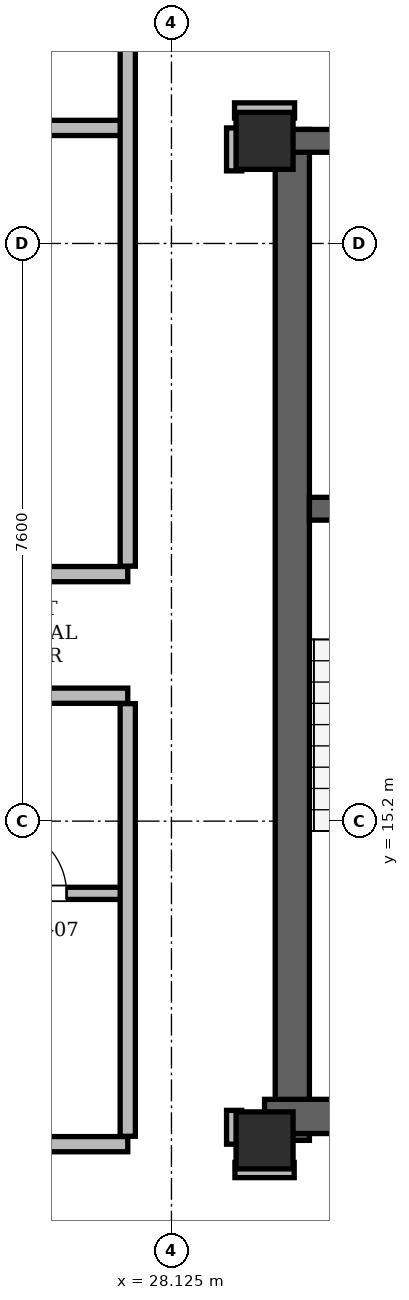
"""IFC4 building model, lengths in metres.
Left out: names, types, materials, properties, quantities, classifications, styles, units other than length and angle.
Written with IfcOpenShell. Run it as: python <this file> out.ifc"""

import sys

from ifc_helpers import new_model, si_unit, direction, frame, frame_2d, origin, origin_2d, place, context, subcontext, project, spatial, rectangle, hollow_rectangle, extrude, element, fill, save


model = new_model("IFC4")
c1 = context("Model", 3, precision=1e-05, world=origin(), true_north=direction((0.0, 1.0)))
c2 = subcontext(c1, "Body", "Model", "MODEL_VIEW")
j1 = project(units=[si_unit("LENGTHUNIT", "METRE"), si_unit("PLANEANGLEUNIT", "RADIAN")], contexts=[c1])
p1 = place(None, origin())
s1 = spatial("IfcSite", under=j1, at=p1, CompositionType="ELEMENT")
p2 = place(p1, origin())
s2 = spatial("IfcBuilding", under=s1, at=p2, CompositionType="ELEMENT")
p3 = place(p2, frame((0.0, 0.0, 145.8)))
s3 = spatial("IfcBuildingStorey", under=s2, at=p3, CompositionType="ELEMENT", Elevation=145.8)
for number, where, z_axis, x_axis in (
    (1, (29.35, 11.0, 0.0), (0.0, 0.0, 1.0), (1.0, 0.0, 0.0)),
    (2, (29.35, 24.15, 0.0), (0.0, 0.0, 1.0), (1.0, 0.0, 0.0)),
):
    element("IfcColumn", number, at=place(p3, frame(where, z_axis=z_axis, x_axis=x_axis)), inside=s3, PredefinedType="COLUMN", context=c2, shape_type="SweptSolid", body=[
        extrude(hollow_rectangle(XDim=0.75, YDim=0.75, WallThickness=0.06, at=origin_2d()), origin(), (0.0, 0.0, 1.0), 3.6),
    ])
p4 = place(p3, frame((29.715, 11.0, 0.0), z_axis=(0.0, 0.0, 1.0), x_axis=(0.0, 1.0, 0.0)))
e3 = element("IfcWall", 3, at=p4, inside=s3, PredefinedType="SHEAR", context=c2, shape_type="SweptSolid", body=[
    extrude(rectangle(XDim=13.3, YDim=0.45, at=frame_2d((6.65, 0.0))), origin(), (0.0, 0.0, 1.0), 3.38),
])
p5 = place(p3, frame((29.35, 11.315, 0.0), z_axis=(0.0, 0.0, 1.0), x_axis=(1.0, 0.0, 0.0)))
e4 = element("IfcWall", 4, at=p5, inside=s3, PredefinedType="SHEAR", context=c2, shape_type="SweptSolid", body=[
    extrude(rectangle(XDim=7.1, YDim=0.45, at=frame_2d((3.55, 0.0))), origin(), (0.0, 0.0, 1.0), 3.38),
])
p6 = place(p3, frame((29.65, 24.15, 0.0), z_axis=(0.0, 0.0, 1.0), x_axis=(1.0, 0.0, 0.0)))
e5 = element("IfcWall", 5, at=p6, inside=s3, PredefinedType="SHEAR", context=c2, shape_type="SweptSolid", body=[
    extrude(rectangle(XDim=15.7, YDim=0.3, at=frame_2d((7.85, 0.0))), origin(), (0.0, 0.0, 1.0), 3.38),
])
p7 = place(p6, frame((1.7, 0.0, 0.0)))
e6 = element("IfcOpeningElement", 6, at=p7, cuts=e5, PredefinedType="OPENING", context=c2, shape_type="SweptSolid", body=[
    extrude(rectangle(XDim=1.2, YDim=2.2, at=frame_2d((0.6, 1.1))), frame((0.0, 0.15, 0.0), z_axis=(0.0, -1.0, 0.0), x_axis=(1.0, 0.0, 0.0)), (0.0, 0.0, 1.0), 0.3),
])
p8 = place(p6, frame((12.8, 0.0, 0.0)))
e7 = element("IfcOpeningElement", 7, at=p8, cuts=e5, PredefinedType="OPENING", context=c2, shape_type="SweptSolid", body=[
    extrude(rectangle(XDim=1.2, YDim=2.2, at=frame_2d((0.6, 1.1))), frame((0.0, 0.15, 0.0), z_axis=(0.0, -1.0, 0.0), x_axis=(1.0, 0.0, 0.0)), (0.0, 0.0, 1.0), 0.3),
])
p9 = place(p6, frame((7.4, 0.0, 0.0)))
e8 = element("IfcOpeningElement", 8, at=p9, cuts=e5, PredefinedType="OPENING", context=c2, shape_type="SweptSolid", body=[
    extrude(rectangle(XDim=0.9, YDim=2.05, at=frame_2d((0.45, 1.025))), frame((0.0, 0.15, 0.0), z_axis=(0.0, -1.0, 0.0), x_axis=(1.0, 0.0, 0.0)), (0.0, 0.0, 1.0), 0.3),
])
p10 = place(p3, frame((29.94, 19.31, 0.0), z_axis=(0.0, 0.0, 1.0), x_axis=(1.0, 0.0, 0.0)))
e9 = element("IfcWall", 9, at=p10, inside=s3, PredefinedType="SHEAR", context=c2, shape_type="SweptSolid", body=[
    extrude(rectangle(XDim=4.01, YDim=0.3, at=frame_2d((2.005, 0.0))), origin(), (0.0, 0.0, 1.0), 3.38),
])
p11 = place(p10, frame((1.01, 0.0, 0.0)))
e10 = element("IfcOpeningElement", 10, at=p11, cuts=e9, PredefinedType="OPENING", context=c2, shape_type="SweptSolid", body=[
    extrude(rectangle(XDim=1.4, YDim=2.2, at=frame_2d((0.7, 1.1))), frame((0.0, 0.15, 0.0), z_axis=(0.0, -1.0, 0.0), x_axis=(1.0, 0.0, 0.0)), (0.0, 0.0, 1.0), 0.3),
])
p12 = place(p3, frame((32.649, 43.341, 0.0), z_axis=(0.0, 0.0, 1.0), x_axis=(-0.500002412417, -0.86602401097, 0.0)))
e11 = element("IfcWall", 11, at=p12, inside=s3, PredefinedType="SOLIDWALL", context=c2, shape_type="SweptSolid", body=[
    extrude(rectangle(XDim=35.404, YDim=0.34, at=frame_2d((17.702, 0.0))), origin(), (0.0, 0.0, 1.0), 2.6),
])
p13 = place(p12, frame((6.579, 0.0, 0.0)))
e12 = element("IfcOpeningElement", 12, at=p13, cuts=e11, PredefinedType="OPENING", context=c2, shape_type="SweptSolid", body=[
    extrude(rectangle(XDim=1.5, YDim=2.2, at=frame_2d((0.75, 1.1))), frame((0.0, 0.17, 0.0), z_axis=(0.0, -1.0, 0.0), x_axis=(1.0, 0.0, 0.0)), (0.0, 0.0, 1.0), 0.34),
])
p14 = place(p12, frame((26.289, 0.0, 0.0)))
e13 = element("IfcOpeningElement", 13, at=p14, cuts=e11, PredefinedType="OPENING", context=c2, shape_type="SweptSolid", body=[
    extrude(rectangle(XDim=1.5, YDim=2.2, at=frame_2d((0.75, 1.1))), frame((0.0, 0.17, 0.0), z_axis=(0.0, -1.0, 0.0), x_axis=(1.0, 0.0, 0.0)), (0.0, 0.0, 1.0), 0.34),
])
p15 = place(p12, frame((22.194, 0.0, 0.85)))
e14 = element("IfcOpeningElement", 14, at=p15, cuts=e11, PredefinedType="OPENING", context=c2, shape_type="SweptSolid", body=[
    extrude(rectangle(XDim=1.2, YDim=1.48, at=frame_2d((0.6, 0.74))), frame((0.0, 0.17, 0.0), z_axis=(0.0, -1.0, 0.0), x_axis=(1.0, 0.0, 0.0)), (0.0, 0.0, 1.0), 0.34),
])
p16 = place(p12, frame((2.317, 0.0, 0.85)))
e15 = element("IfcOpeningElement", 15, at=p16, cuts=e11, PredefinedType="OPENING", context=c2, shape_type="SweptSolid", body=[
    extrude(rectangle(XDim=1.6, YDim=1.64, at=frame_2d((0.8, 0.82))), frame((0.0, 0.17, 0.0), z_axis=(0.0, -1.0, 0.0), x_axis=(1.0, 0.0, 0.0)), (0.0, 0.0, 1.0), 0.34),
])
p17 = place(p12, frame((12.951, 0.0, 0.85)))
e16 = element("IfcOpeningElement", 16, at=p17, cuts=e11, PredefinedType="OPENING", context=c2, shape_type="SweptSolid", body=[
    extrude(rectangle(XDim=3.0, YDim=1.64, at=frame_2d((1.5, 0.82))), frame((0.0, 0.17, 0.0), z_axis=(0.0, -1.0, 0.0), x_axis=(1.0, 0.0, 0.0)), (0.0, 0.0, 1.0), 0.34),
])
p18 = place(p12, frame((20.282, 0.0, 0.85)))
e17 = element("IfcOpeningElement", 17, at=p18, cuts=e11, PredefinedType="OPENING", context=c2, shape_type="SweptSolid", body=[
    extrude(rectangle(XDim=1.2, YDim=1.48, at=frame_2d((0.6, 0.74))), frame((0.0, 0.17, 0.0), z_axis=(0.0, -1.0, 0.0), x_axis=(1.0, 0.0, 0.0)), (0.0, 0.0, 1.0), 0.34),
])
p19 = place(p12, frame((33.524, 0.0, 0.85)))
e18 = element("IfcOpeningElement", 18, at=p19, cuts=e11, PredefinedType="OPENING", context=c2, shape_type="SweptSolid", body=[
    extrude(rectangle(XDim=1.2, YDim=1.48, at=frame_2d((0.6, 0.74))), frame((0.0, 0.17, 0.0), z_axis=(0.0, -1.0, 0.0), x_axis=(1.0, 0.0, 0.0)), (0.0, 0.0, 1.0), 0.34),
])
p20 = place(p3, frame((28.96, 10.61, 0.0), z_axis=(0.0, 0.0, 1.0), x_axis=(1.0, 0.0, 0.0)))
e19 = element("IfcWall", 19, at=p20, inside=s3, PredefinedType="PARTITIONING", context=c2, shape_type="SweptSolid", body=[
    extrude(rectangle(XDim=0.78, YDim=0.2, at=frame_2d((0.39, 0.0))), origin(), (0.0, 0.0, 1.0), 2.42),
])
p21 = place(p3, frame((16.148, 10.95, 0.0), z_axis=(0.0, 0.0, 1.0), x_axis=(1.0, 0.0, 0.0)))
e20 = element("IfcWall", 20, at=p21, inside=s3, PredefinedType="PARTITIONING", context=c2, shape_type="SweptSolid", body=[
    extrude(rectangle(XDim=11.402, YDim=0.2, at=frame_2d((5.701, 0.0))), origin(), (0.0, 0.0, 1.0), 3.38),
])
p22 = place(p21, frame((7.001, 0.0, 0.0)))
e21 = element("IfcOpeningElement", 21, at=p22, cuts=e20, PredefinedType="OPENING", context=c2, shape_type="SweptSolid", body=[
    extrude(rectangle(XDim=1.0, YDim=2.18, at=frame_2d((0.5, 1.09))), frame((0.0, 0.1, 0.0), z_axis=(0.0, -1.0, 0.0), x_axis=(1.0, 0.0, 0.0)), (0.0, 0.0, 1.0), 0.2),
])
p23 = place(p3, frame((16.055, 14.25, 0.0), z_axis=(0.0, 0.0, 1.0), x_axis=(1.0, 0.0, 0.0)))
e22 = element("IfcWall", 22, at=p23, inside=s3, PredefinedType="PARTITIONING", context=c2, shape_type="SweptSolid", body=[
    extrude(rectangle(XDim=11.545, YDim=0.16, at=frame_2d((5.773, 0.0))), origin(), (0.0, 0.0, 1.0), 3.38),
])
p24 = place(p23, frame((1.147, 0.0, 0.0)))
e23 = element("IfcOpeningElement", 23, at=p24, cuts=e22, PredefinedType="OPENING", context=c2, shape_type="SweptSolid", body=[
    extrude(rectangle(XDim=0.95, YDim=2.1, at=frame_2d((0.475, 1.05))), frame((0.0, 0.08, 0.0), z_axis=(0.0, -1.0, 0.0), x_axis=(1.0, 0.0, 0.0)), (0.0, 0.0, 1.0), 0.16),
])
p25 = place(p23, frame((4.255, 0.0, 0.0)))
e24 = element("IfcOpeningElement", 24, at=p25, cuts=e22, PredefinedType="OPENING", context=c2, shape_type="SweptSolid", body=[
    extrude(rectangle(XDim=0.95, YDim=2.1, at=frame_2d((0.475, 1.05))), frame((0.0, 0.08, 0.0), z_axis=(0.0, -1.0, 0.0), x_axis=(1.0, 0.0, 0.0)), (0.0, 0.0, 1.0), 0.16),
])
p26 = place(p23, frame((7.092, 0.0, 0.0)))
e25 = element("IfcOpeningElement", 25, at=p26, cuts=e22, PredefinedType="OPENING", context=c2, shape_type="SweptSolid", body=[
    extrude(rectangle(XDim=0.95, YDim=2.1, at=frame_2d((0.475, 1.05))), frame((0.0, 0.08, 0.0), z_axis=(0.0, -1.0, 0.0), x_axis=(1.0, 0.0, 0.0)), (0.0, 0.0, 1.0), 0.16),
])
p27 = place(p23, frame((9.81, 0.0, 0.0)))
e26 = element("IfcOpeningElement", 26, at=p27, cuts=e22, PredefinedType="OPENING", context=c2, shape_type="SweptSolid", body=[
    extrude(rectangle(XDim=0.88, YDim=2.08, at=frame_2d((0.44, 1.04))), frame((0.0, 0.08, 0.0), z_axis=(0.0, -1.0, 0.0), x_axis=(1.0, 0.0, 0.0)), (0.0, 0.0, 1.0), 0.16),
])
p28 = place(p3, frame((17.556, 16.85, 0.0), z_axis=(0.0, 0.0, 1.0), x_axis=(1.0, 0.0, 0.0)))
e27 = element("IfcWall", 27, at=p28, inside=s3, PredefinedType="PARTITIONING", context=c2, shape_type="SweptSolid", body=[
    extrude(rectangle(XDim=9.994, YDim=0.2, at=frame_2d((4.997, 0.0))), origin(), (0.0, 0.0, 1.0), 3.38),
])
p29 = place(p3, frame((18.479, 18.45, 0.0), z_axis=(0.0, 0.0, 1.0), x_axis=(1.0, 0.0, 0.0)))
e28 = element("IfcWall", 28, at=p29, inside=s3, PredefinedType="PARTITIONING", context=c2, shape_type="SweptSolid", body=[
    extrude(rectangle(XDim=9.071, YDim=0.2, at=frame_2d((4.535, 0.0))), origin(), (0.0, 0.0, 1.0), 3.38),
])
p30 = place(p29, frame((4.941, 0.0, 0.0)))
e29 = element("IfcOpeningElement", 29, at=p30, cuts=e28, PredefinedType="OPENING", context=c2, shape_type="SweptSolid", body=[
    extrude(rectangle(XDim=1.0, YDim=2.18, at=frame_2d((0.5, 1.09))), frame((0.0, 0.1, 0.0), z_axis=(0.0, -1.0, 0.0), x_axis=(1.0, 0.0, 0.0)), (0.0, 0.0, 1.0), 0.2),
])
p31 = place(p3, frame((21.869, 24.32, 0.0), z_axis=(0.0, 0.0, 1.0), x_axis=(1.0, 0.0, 0.0)))
e30 = element("IfcWall", 30, at=p31, inside=s3, PredefinedType="PARTITIONING", context=c2, shape_type="SweptSolid", body=[
    extrude(rectangle(XDim=5.681, YDim=0.2, at=frame_2d((2.841, 0.0))), origin(), (0.0, 0.0, 1.0), 3.38),
])
p32 = place(p3, frame((28.955, 24.55, 0.0), z_axis=(0.0, 0.0, 1.0), x_axis=(1.0, 0.0, 0.0)))
e31 = element("IfcWall", 31, at=p32, inside=s3, PredefinedType="PARTITIONING", context=c2, shape_type="SweptSolid", body=[
    extrude(rectangle(XDim=0.79, YDim=0.2, at=frame_2d((0.395, 0.0))), origin(), (0.0, 0.0, 1.0), 2.842),
])
p33 = place(p3, frame((27.55, 11.054, 0.0), z_axis=(0.0, 0.0, 1.0), x_axis=(0.0, 1.0, 0.0)))
e32 = element("IfcWall", 32, at=p33, inside=s3, PredefinedType="PARTITIONING", context=c2, shape_type="SweptSolid", body=[
    extrude(rectangle(XDim=5.692, YDim=0.2, at=frame_2d((2.846, 0.0))), origin(), (0.0, 0.0, 1.0), 2.842),
])
p34 = place(p3, frame((27.55, 18.554, 0.0), z_axis=(0.0, 0.0, 1.0), x_axis=(0.0, 1.0, 0.0)))
e33 = element("IfcWall", 33, at=p34, inside=s3, PredefinedType="PARTITIONING", context=c2, shape_type="SweptSolid", body=[
    extrude(rectangle(XDim=7.312, YDim=0.2, at=frame_2d((3.656, 0.0))), origin(), (0.0, 0.0, 1.0), 3.38),
])
p35 = place(p3, frame((28.95, 10.95, 0.0), z_axis=(0.0, 0.0, 1.0), x_axis=(0.0, 1.0, 0.0)))
e34 = element("IfcWall", 34, at=p35, inside=s3, PredefinedType="PARTITIONING", context=c2, shape_type="SweptSolid", body=[
    extrude(rectangle(XDim=0.445, YDim=0.2, at=frame_2d((0.223, 0.0))), origin(), (0.0, 0.0, 1.0), 2.842),
])
p36 = place(p3, frame((28.95, 23.755, 0.0), z_axis=(0.0, 0.0, 1.0), x_axis=(0.0, 1.0, 0.0)))
e35 = element("IfcWall", 35, at=p36, inside=s3, PredefinedType="PARTITIONING", context=c2, shape_type="SweptSolid", body=[
    extrude(rectangle(XDim=0.565, YDim=0.2, at=frame_2d((0.283, 0.0))), origin(), (0.0, 0.0, 1.0), 3.38),
])
p37 = place(p27, origin())
e36 = element("IfcDoor", 36, at=p37, inside=s3, OperationType="SINGLE_SWING_LEFT", PredefinedType="DOOR", context=c2, shape_type="SweptSolid", body=[
    extrude(rectangle(XDim=0.88, YDim=2.08, at=frame_2d((0.44, 1.04))), frame((0.0, 0.025, 0.0), z_axis=(0.0, -1.0, 0.0), x_axis=(1.0, 0.0, 0.0)), (0.0, 0.0, 1.0), 0.05),
])
fill(e26, e36)
save(model, sys.argv[1])
